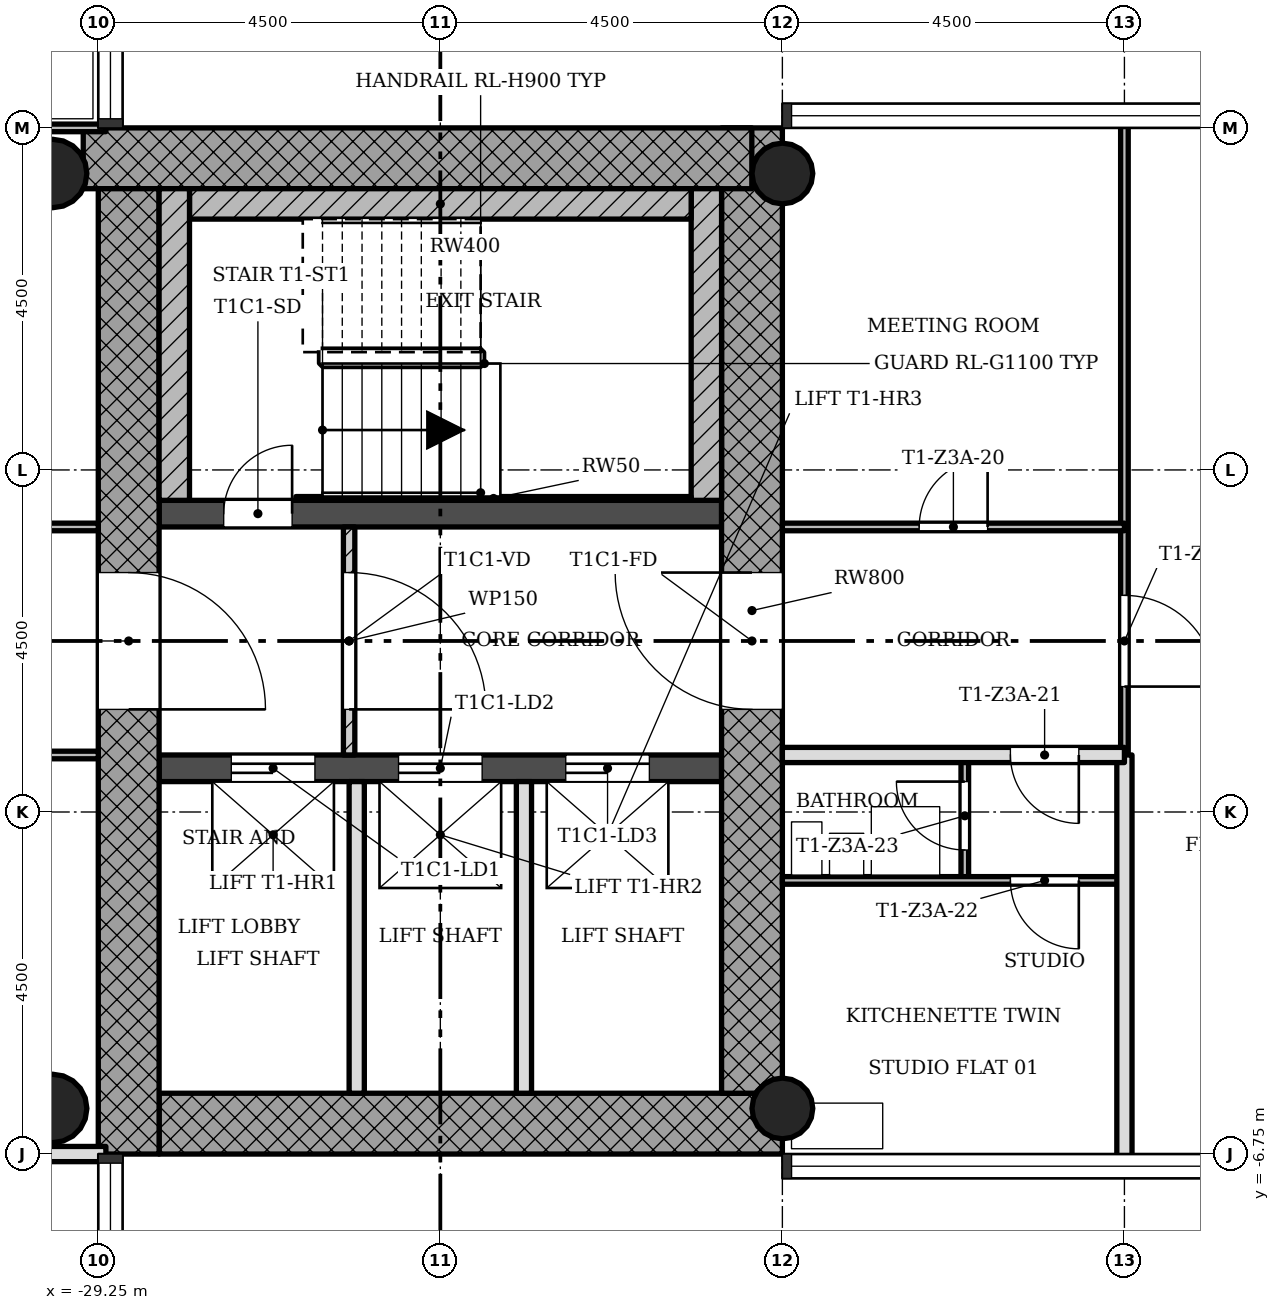
"""IFC4 building model, lengths in metres.
Left out: names, types, materials, properties, quantities, classifications, styles, units other than length and angle.
Written with IfcOpenShell. Run it as: python <this file> out.ifc"""

import sys

from ifc_helpers import new_model, si_unit, direction, frame, frame_2d, origin, origin_2d, place, context, subcontext, project, spatial, rectangle, hollow_circle, extrude, element, fill, save


model = new_model("IFC4")
c1 = context("Model", 3, precision=1e-05, world=origin(), true_north=direction((0.0, 1.0)))
c2 = subcontext(c1, "Body", "Model", "MODEL_VIEW")
j1 = project(units=[si_unit("LENGTHUNIT", "METRE"), si_unit("PLANEANGLEUNIT", "RADIAN")], contexts=[c1])
p1 = place(None, origin())
s1 = spatial("IfcSite", under=j1, at=p1, CompositionType="ELEMENT")
p2 = place(p1, origin())
s2 = spatial("IfcBuilding", under=s1, at=p2, CompositionType="ELEMENT")
p3 = place(p2, frame((0.0, 0.0, 133.7)))
s3 = spatial("IfcBuildingStorey", under=s2, at=p3, CompositionType="ELEMENT", Elevation=133.7)
p4 = place(p3, frame((-28.45, -6.35, 0.0), z_axis=(0.0, 0.0, 1.0), x_axis=(1.0, 0.0, 0.0)))
e1 = element("IfcWall", 1, at=p4, inside=s3, PredefinedType="SHEAR", context=c2, shape_type="SweptSolid", body=[
    extrude(rectangle(XDim=8.2, YDim=0.8, at=frame_2d((4.1, 0.0))), origin(), (0.0, 0.0, 1.0), 3.4),
])
p5 = place(p3, frame((-20.65, -5.95, 0.0), z_axis=(0.0, 0.0, 1.0), x_axis=(0.0, 1.0, 0.0)))
e2 = element("IfcWall", 2, at=p5, inside=s3, PredefinedType="SHEAR", context=c2, shape_type="SweptSolid", body=[
    extrude(rectangle(XDim=12.7, YDim=0.8, at=frame_2d((6.35, 0.0))), origin(), (0.0, 0.0, 1.0), 3.4),
])
p6 = place(p5, frame((5.05, 0.0, 0.0)))
e3 = element("IfcOpeningElement", 3, at=p6, cuts=e2, PredefinedType="OPENING", context=c2, shape_type="SweptSolid", body=[
    extrude(rectangle(XDim=1.8, YDim=2.1, at=frame_2d((0.9, 1.05))), frame((0.0, 0.41, 0.0), z_axis=(0.0, -1.0, 0.0), x_axis=(1.0, 0.0, 0.0)), (0.0, 0.0, 1.0), 0.82),
])
p7 = place(p3, frame((-20.652, 6.35, 0.0), z_axis=(0.0, 0.0, 1.0), x_axis=(-1.0, 0.0, 0.0)))
e4 = element("IfcWall", 4, at=p7, inside=s3, PredefinedType="SHEAR", context=c2, shape_type="SweptSolid", body=[
    extrude(rectangle(XDim=8.796, YDim=0.8, at=frame_2d((4.398, 0.0))), origin(), (0.0, 0.0, 1.0), 3.4),
])
p8 = place(p3, frame((-28.85, 5.95, 0.0), z_axis=(0.0, 0.0, 1.0), x_axis=(0.0, -1.0, 0.0)))
e5 = element("IfcWall", 5, at=p8, inside=s3, PredefinedType="SHEAR", context=c2, shape_type="SweptSolid", body=[
    extrude(rectangle(XDim=12.7, YDim=0.8, at=frame_2d((6.35, 0.0))), origin(), (0.0, 0.0, 1.0), 3.4),
])
p9 = place(p8, frame((5.05, 0.0, 0.0)))
e6 = element("IfcOpeningElement", 6, at=p9, cuts=e5, PredefinedType="OPENING", context=c2, shape_type="SweptSolid", body=[
    extrude(rectangle(XDim=1.8, YDim=2.1, at=frame_2d((0.9, 1.05))), frame((0.0, 0.41, 0.0), z_axis=(0.0, -1.0, 0.0), x_axis=(1.0, 0.0, 0.0)), (0.0, 0.0, 1.0), 0.82),
])
p10 = place(p3, frame((-28.45, -1.675, 0.0), z_axis=(0.0, 0.0, 1.0), x_axis=(1.0, 0.0, 0.0)))
e7 = element("IfcWall", 7, at=p10, inside=s3, PredefinedType="SHEAR", context=c2, shape_type="SweptSolid", body=[
    extrude(rectangle(XDim=7.4, YDim=0.35, at=frame_2d((3.7, 0.0))), origin(), (0.0, 0.0, 1.0), 3.4),
])
p11 = place(p10, frame((0.95, 0.0, 0.0)))
e8 = element("IfcOpeningElement", 8, at=p11, cuts=e7, PredefinedType="OPENING", context=c2, shape_type="SweptSolid", body=[
    extrude(rectangle(XDim=1.1, YDim=2.1, at=frame_2d((0.55, 1.05))), frame((0.0, 0.185, 0.0), z_axis=(0.0, -1.0, 0.0), x_axis=(1.0, 0.0, 0.0)), (0.0, 0.0, 1.0), 0.37),
])
p12 = place(p10, frame((3.15, 0.0, 0.0)))
e9 = element("IfcOpeningElement", 9, at=p12, cuts=e7, PredefinedType="OPENING", context=c2, shape_type="SweptSolid", body=[
    extrude(rectangle(XDim=1.1, YDim=2.1, at=frame_2d((0.55, 1.05))), frame((0.0, 0.185, 0.0), z_axis=(0.0, -1.0, 0.0), x_axis=(1.0, 0.0, 0.0)), (0.0, 0.0, 1.0), 0.37),
])
p13 = place(p10, frame((5.35, 0.0, 0.0)))
e10 = element("IfcOpeningElement", 10, at=p13, cuts=e7, PredefinedType="OPENING", context=c2, shape_type="SweptSolid", body=[
    extrude(rectangle(XDim=1.1, YDim=2.1, at=frame_2d((0.55, 1.05))), frame((0.0, 0.185, 0.0), z_axis=(0.0, -1.0, 0.0), x_axis=(1.0, 0.0, 0.0)), (0.0, 0.0, 1.0), 0.37),
])
p14 = place(p3, frame((-28.45, 1.675, 0.0), z_axis=(0.0, 0.0, 1.0), x_axis=(1.0, 0.0, 0.0)))
e11 = element("IfcWall", 11, at=p14, inside=s3, PredefinedType="SHEAR", context=c2, shape_type="SweptSolid", body=[
    extrude(rectangle(XDim=7.4, YDim=0.35, at=frame_2d((3.7, 0.0))), origin(), (0.0, 0.0, 1.0), 3.4),
])
p15 = place(p14, frame((0.85, 0.0, 0.0)))
e12 = element("IfcOpeningElement", 12, at=p15, cuts=e11, PredefinedType="OPENING", context=c2, shape_type="SweptSolid", body=[
    extrude(rectangle(XDim=0.9, YDim=2.1, at=frame_2d((0.45, 1.05))), frame((0.0, 0.185, 0.0), z_axis=(0.0, -1.0, 0.0), x_axis=(1.0, 0.0, 0.0)), (0.0, 0.0, 1.0), 0.37),
])
for number, where, z_axis, x_axis in (
    (13, (-20.25, -6.15, 0.0), (0.0, 0.0, 1.0), (1.0, 0.0, 0.0)),
    (14, (-20.25, 6.15, 0.0), (0.0, 0.0, 1.0), (1.0, 0.0, 0.0)),
):
    element("IfcColumn", number, at=place(p3, frame(where, z_axis=z_axis, x_axis=x_axis)), inside=s3, PredefinedType="COLUMN", context=c2, shape_type="SweptSolid", body=[
        extrude(hollow_circle(Radius=0.4, WallThickness=0.028, at=origin_2d()), origin(), (0.0, 0.0, 1.0), 3.4),
    ])
for number, where, z_axis, x_axis in (
    (15, (-29.85, -6.15, 0.0), (0.0, 0.0, 1.0), (1.0, 0.0, 0.0)),
    (16, (-29.85, 6.15, 0.0), (0.0, 0.0, 1.0), (1.0, 0.0, 0.0)),
):
    element("IfcColumn", number, at=place(p3, frame(where, z_axis=z_axis, x_axis=x_axis)), inside=s3, PredefinedType="COLUMN", context=c2, shape_type="SweptSolid", body=[
        extrude(hollow_circle(Radius=0.45, WallThickness=0.032, at=origin_2d()), origin(), (0.0, 0.0, 1.0), 3.4),
    ])
p16 = place(p3, frame((-25.95, -1.5, 0.0), z_axis=(0.0, 0.0, 1.0), x_axis=(0.0, 1.0, 0.0)))
e17 = element("IfcWall", 17, at=p16, inside=s3, PredefinedType="PARTITIONING", context=c2, shape_type="SweptSolid", body=[
    extrude(rectangle(XDim=3.0, YDim=0.15, at=frame_2d((1.5, 0.0))), origin(), (0.0, 0.0, 1.0), 3.0),
])
p17 = place(p16, frame((0.6, 0.0, 0.0)))
e18 = element("IfcOpeningElement", 18, at=p17, cuts=e17, PredefinedType="OPENING", context=c2, shape_type="SweptSolid", body=[
    extrude(rectangle(XDim=1.8, YDim=2.1, at=frame_2d((0.9, 1.05))), frame((0.0, 0.085, 0.0), z_axis=(0.0, -1.0, 0.0), x_axis=(1.0, 0.0, 0.0)), (0.0, 0.0, 1.0), 0.17),
])
for number, where, z_axis, x_axis in (
    (19, (-25.85, -5.95, 0.0), (0.0, 0.0, 1.0), (0.0, 1.0, 0.0)),
    (20, (-23.65, -5.95, 0.0), (0.0, 0.0, 1.0), (0.0, 1.0, 0.0)),
):
    element("IfcWall", number, at=place(p3, frame(where, z_axis=z_axis, x_axis=x_axis)), inside=s3, PredefinedType="SOLIDWALL", context=c2, shape_type="SweptSolid", body=[
        extrude(rectangle(XDim=4.1, YDim=0.2, at=frame_2d((2.05, 0.0))), origin(), (0.0, 0.0, 1.0), 3.0),
    ])
p18 = place(p3, frame((-17.85, -3.15, 0.0), z_axis=(0.0, 0.0, 1.0), x_axis=(0.0, 1.0, 0.0)))
e21 = element("IfcWall", 21, at=p18, inside=s3, PredefinedType="PARTITIONING", context=c2, shape_type="SweptSolid", body=[
    extrude(rectangle(XDim=1.65, YDim=0.1, at=frame_2d((0.825, 0.0))), origin(), (0.0, 0.0, 1.0), 3.0),
])
p19 = place(p18, frame((0.4, 0.0, 0.0)))
e22 = element("IfcOpeningElement", 22, at=p19, cuts=e21, PredefinedType="OPENING", context=c2, shape_type="SweptSolid", body=[
    extrude(rectangle(XDim=0.9, YDim=2.1, at=frame_2d((0.45, 1.05))), frame((0.0, 0.06, 0.0), z_axis=(0.0, -1.0, 0.0), x_axis=(1.0, 0.0, 0.0)), (0.0, 0.0, 1.0), 0.12),
])
p20 = place(p3, frame((-15.75, -1.5, 0.0), z_axis=(0.0, 0.0, 1.0), x_axis=(0.0, 1.0, 0.0)))
e23 = element("IfcWall", 23, at=p20, inside=s3, PredefinedType="PARTITIONING", context=c2, shape_type="SweptSolid", body=[
    extrude(rectangle(XDim=8.35, YDim=0.1, at=frame_2d((4.175, 0.0))), origin(), (0.0, 0.0, 1.0), 3.0),
])
p21 = place(p20, frame((0.9, 0.0, 0.0)))
e24 = element("IfcOpeningElement", 24, at=p21, cuts=e23, PredefinedType="OPENING", context=c2, shape_type="SweptSolid", body=[
    extrude(rectangle(XDim=1.2, YDim=2.1, at=frame_2d((0.6, 1.05))), frame((0.0, 0.06, 0.0), z_axis=(0.0, -1.0, 0.0), x_axis=(1.0, 0.0, 0.0)), (0.0, 0.0, 1.0), 0.12),
])
p22 = place(p3, frame((-15.75, -6.85, 0.0), z_axis=(0.0, 0.0, 1.0), x_axis=(0.0, 1.0, 0.0)))
e25 = element("IfcWall", 25, at=p22, inside=s3, PredefinedType="SOLIDWALL", context=c2, shape_type="SweptSolid", body=[
    extrude(rectangle(XDim=5.35, YDim=0.2, at=frame_2d((2.675, 0.0))), origin(), (0.0, 0.0, 1.0), 3.0),
])
p23 = place(p3, frame((-42.85, -6.75, 0.0), z_axis=(0.0, 0.0, 1.0), x_axis=(1.0, 0.0, 0.0)))
e26 = element("IfcWall", 26, at=p23, inside=s3, PredefinedType="SOLIDWALL", context=c2, shape_type="SweptSolid", body=[
    extrude(rectangle(XDim=13.7, YDim=0.2, at=frame_2d((6.85, 0.0))), origin(), (0.0, 0.0, 1.0), 3.0),
])
p24 = place(p23, frame((6.4, 0.0, 0.0)))
e27 = element("IfcOpeningElement", 27, at=p24, cuts=e26, PredefinedType="OPENING", context=c2, shape_type="SweptSolid", body=[
    extrude(rectangle(XDim=0.9, YDim=2.1, at=frame_2d((0.45, 1.05))), frame((0.0, 0.11, 0.0), z_axis=(0.0, -1.0, 0.0), x_axis=(1.0, 0.0, 0.0)), (0.0, 0.0, 1.0), 0.22),
])
p25 = place(p3, frame((-20.25, -3.15, 0.0), z_axis=(0.0, 0.0, 1.0), x_axis=(1.0, 0.0, 0.0)))
e28 = element("IfcWall", 28, at=p25, inside=s3, PredefinedType="PARTITIONING", context=c2, shape_type="SweptSolid", body=[
    extrude(rectangle(XDim=4.5, YDim=0.1, at=frame_2d((2.25, 0.0))), origin(), (0.0, 0.0, 1.0), 3.0),
])
p26 = place(p25, frame((3.0, 0.0, 0.0)))
e29 = element("IfcOpeningElement", 29, at=p26, cuts=e28, PredefinedType="OPENING", context=c2, shape_type="SweptSolid", body=[
    extrude(rectangle(XDim=0.9, YDim=2.1, at=frame_2d((0.45, 1.05))), frame((0.0, 0.06, 0.0), z_axis=(0.0, -1.0, 0.0), x_axis=(1.0, 0.0, 0.0)), (0.0, 0.0, 1.0), 0.12),
])
p27 = place(p3, frame((-31.5, -1.5, 0.0), z_axis=(0.0, 0.0, 1.0), x_axis=(1.0, 0.0, 0.0)))
e30 = element("IfcWall", 30, at=p27, inside=s3, PredefinedType="PARTITIONING", context=c2, shape_type="SweptSolid", body=[
    extrude(rectangle(XDim=2.25, YDim=0.1, at=frame_2d((1.125, 0.0))), origin(), (0.0, 0.0, 1.0), 3.0),
])
p28 = place(p3, frame((-20.25, -1.5, 0.0), z_axis=(0.0, 0.0, 1.0), x_axis=(1.0, 0.0, 0.0)))
e31 = element("IfcWall", 31, at=p28, inside=s3, PredefinedType="SOLIDWALL", context=c2, shape_type="SweptSolid", body=[
    extrude(rectangle(XDim=4.5, YDim=0.2, at=frame_2d((2.25, 0.0))), origin(), (0.0, 0.0, 1.0), 3.0),
])
p29 = place(p28, frame((3.0, 0.0, 0.0)))
e32 = element("IfcOpeningElement", 32, at=p29, cuts=e31, PredefinedType="OPENING", context=c2, shape_type="SweptSolid", body=[
    extrude(rectangle(XDim=0.9, YDim=2.1, at=frame_2d((0.45, 1.05))), frame((0.0, 0.11, 0.0), z_axis=(0.0, -1.0, 0.0), x_axis=(1.0, 0.0, 0.0)), (0.0, 0.0, 1.0), 0.22),
])
p30 = place(p3, frame((-31.5, 1.5, 0.0), z_axis=(0.0, 0.0, 1.0), x_axis=(1.0, 0.0, 0.0)))
e33 = element("IfcWall", 33, at=p30, inside=s3, PredefinedType="PARTITIONING", context=c2, shape_type="SweptSolid", body=[
    extrude(rectangle(XDim=2.25, YDim=0.1, at=frame_2d((1.125, 0.0))), origin(), (0.0, 0.0, 1.0), 3.0),
])
p31 = place(p3, frame((-20.25, 1.5, 0.0), z_axis=(0.0, 0.0, 1.0), x_axis=(1.0, 0.0, 0.0)))
e34 = element("IfcWall", 34, at=p31, inside=s3, PredefinedType="PARTITIONING", context=c2, shape_type="SweptSolid", body=[
    extrude(rectangle(XDim=4.5, YDim=0.1, at=frame_2d((2.25, 0.0))), origin(), (0.0, 0.0, 1.0), 3.0),
])
p32 = place(p31, frame((1.8, 0.0, 0.0)))
e35 = element("IfcOpeningElement", 35, at=p32, cuts=e34, PredefinedType="OPENING", context=c2, shape_type="SweptSolid", body=[
    extrude(rectangle(XDim=0.9, YDim=2.1, at=frame_2d((0.45, 1.05))), frame((0.0, 0.06, 0.0), z_axis=(0.0, -1.0, 0.0), x_axis=(1.0, 0.0, 0.0)), (0.0, 0.0, 1.0), 0.12),
])
p33 = place(p3, frame((-35.1, 6.75, 0.0), z_axis=(0.0, 0.0, 1.0), x_axis=(1.0, 0.0, 0.0)))
e36 = element("IfcWall", 36, at=p33, inside=s3, PredefinedType="PARTITIONING", context=c2, shape_type="SweptSolid", body=[
    extrude(rectangle(XDim=5.95, YDim=0.1, at=frame_2d((2.975, 0.0))), origin(), (0.0, 0.0, 1.0), 3.0),
])
p34 = place(p3, frame((-21.25, 1.85, 0.0), z_axis=(0.0, 0.0, 1.0), x_axis=(0.0, 1.0, 0.0)))
e37 = element("IfcWall", 37, at=p34, inside=s3, PredefinedType="SHEAR", context=c2, shape_type="SweptSolid", body=[
    extrude(rectangle(XDim=4.1, YDim=0.4, at=frame_2d((2.05, 0.0))), origin(), (0.0, 0.0, 1.0), 3.4),
])
p35 = place(p3, frame((-28.05, 5.75, 0.0), z_axis=(0.0, 0.0, 1.0), x_axis=(1.0, 0.0, 0.0)))
e38 = element("IfcWall", 38, at=p35, inside=s3, PredefinedType="SHEAR", context=c2, shape_type="SweptSolid", body=[
    extrude(rectangle(XDim=6.6, YDim=0.4, at=frame_2d((3.3, 0.0))), origin(), (0.0, 0.0, 1.0), 3.4),
])
p36 = place(p3, frame((-28.25, 1.85, 0.0), z_axis=(0.0, 0.0, 1.0), x_axis=(0.0, 1.0, 0.0)))
e39 = element("IfcWall", 39, at=p36, inside=s3, PredefinedType="SHEAR", context=c2, shape_type="SweptSolid", body=[
    extrude(rectangle(XDim=4.1, YDim=0.4, at=frame_2d((2.05, 0.0))), origin(), (0.0, 0.0, 1.0), 3.4),
])
p37 = place(p3, frame((-26.65, 1.875, 0.0), z_axis=(0.0, 0.0, 1.0), x_axis=(1.0, 0.0, 0.0)))
e40 = element("IfcWall", 40, at=p37, inside=s3, PredefinedType="SHEAR", context=c2, shape_type="SweptSolid", body=[
    extrude(rectangle(XDim=5.2, YDim=0.05, at=frame_2d((2.6, 0.0))), origin(), (0.0, 0.0, 1.0), 3.4),
])
p38 = place(p17, origin())
e41 = element("IfcDoor", 41, at=p38, inside=s3, OperationType="SINGLE_SWING_LEFT", PredefinedType="DOOR", context=c2, shape_type="SweptSolid", body=[
    extrude(rectangle(XDim=1.8, YDim=2.1, at=frame_2d((0.9, 1.05))), frame((0.0, 0.025, 0.0), z_axis=(0.0, -1.0, 0.0), x_axis=(1.0, 0.0, 0.0)), (0.0, 0.0, 1.0), 0.05),
])
fill(e18, e41)
p39 = place(p32, origin())
e42 = element("IfcDoor", 42, at=p39, inside=s3, OperationType="SINGLE_SWING_LEFT", PredefinedType="DOOR", context=c2, shape_type="SweptSolid", body=[
    extrude(rectangle(XDim=0.9, YDim=2.1, at=frame_2d((0.45, 1.05))), frame((0.0, 0.025, 0.0), z_axis=(0.0, -1.0, 0.0), x_axis=(1.0, 0.0, 0.0)), (0.0, 0.0, 1.0), 0.05),
])
fill(e35, e42)
p40 = place(p29, origin())
e43 = element("IfcDoor", 43, at=p40, inside=s3, OperationType="SINGLE_SWING_RIGHT", PredefinedType="DOOR", context=c2, shape_type="SweptSolid", body=[
    extrude(rectangle(XDim=0.9, YDim=2.1, at=frame_2d((0.45, 1.05))), frame((0.0, 0.025, 0.0), z_axis=(0.0, -1.0, 0.0), x_axis=(1.0, 0.0, 0.0)), (0.0, 0.0, 1.0), 0.05),
])
fill(e32, e43)
p41 = place(p26, origin())
e44 = element("IfcDoor", 44, at=p41, inside=s3, OperationType="SINGLE_SWING_RIGHT", PredefinedType="DOOR", context=c2, shape_type="SweptSolid", body=[
    extrude(rectangle(XDim=0.9, YDim=2.1, at=frame_2d((0.45, 1.05))), frame((0.0, 0.025, 0.0), z_axis=(0.0, -1.0, 0.0), x_axis=(1.0, 0.0, 0.0)), (0.0, 0.0, 1.0), 0.05),
])
fill(e29, e44)
p42 = place(p19, origin())
e45 = element("IfcDoor", 45, at=p42, inside=s3, OperationType="SINGLE_SWING_LEFT", PredefinedType="DOOR", context=c2, shape_type="SweptSolid", body=[
    extrude(rectangle(XDim=0.9, YDim=2.1, at=frame_2d((0.45, 1.05))), frame((0.0, 0.025, 0.0), z_axis=(0.0, -1.0, 0.0), x_axis=(1.0, 0.0, 0.0)), (0.0, 0.0, 1.0), 0.05),
])
fill(e22, e45)
p43 = place(p21, origin())
e46 = element("IfcDoor", 46, at=p43, inside=s3, OperationType="SINGLE_SWING_LEFT", PredefinedType="DOOR", context=c2, shape_type="SweptSolid", body=[
    extrude(rectangle(XDim=1.2, YDim=2.1, at=frame_2d((0.6, 1.05))), frame((0.0, 0.025, 0.0), z_axis=(0.0, -1.0, 0.0), x_axis=(1.0, 0.0, 0.0)), (0.0, 0.0, 1.0), 0.05),
])
fill(e24, e46)
p44 = place(p15, origin())
e47 = element("IfcDoor", 47, at=p44, inside=s3, OperationType="SINGLE_SWING_LEFT", PredefinedType="DOOR", context=c2, shape_type="SweptSolid", body=[
    extrude(rectangle(XDim=0.9, YDim=2.1, at=frame_2d((0.45, 1.05))), frame((0.0, 0.025, 0.0), z_axis=(0.0, -1.0, 0.0), x_axis=(1.0, 0.0, 0.0)), (0.0, 0.0, 1.0), 0.05),
])
fill(e12, e47)
p45 = place(p11, origin())
e48 = element("IfcDoor", 48, at=p45, inside=s3, OperationType="SLIDING_TO_LEFT", PredefinedType="DOOR", context=c2, shape_type="SweptSolid", body=[
    extrude(rectangle(XDim=1.1, YDim=2.1, at=frame_2d((0.55, 1.05))), frame((0.0, 0.025, 0.0), z_axis=(0.0, -1.0, 0.0), x_axis=(1.0, 0.0, 0.0)), (0.0, 0.0, 1.0), 0.05),
])
fill(e8, e48)
p46 = place(p12, origin())
e49 = element("IfcDoor", 49, at=p46, inside=s3, OperationType="SLIDING_TO_LEFT", PredefinedType="DOOR", context=c2, shape_type="SweptSolid", body=[
    extrude(rectangle(XDim=1.1, YDim=2.1, at=frame_2d((0.55, 1.05))), frame((0.0, 0.025, 0.0), z_axis=(0.0, -1.0, 0.0), x_axis=(1.0, 0.0, 0.0)), (0.0, 0.0, 1.0), 0.05),
])
fill(e9, e49)
p47 = place(p13, origin())
e50 = element("IfcDoor", 50, at=p47, inside=s3, OperationType="SLIDING_TO_LEFT", PredefinedType="DOOR", context=c2, shape_type="SweptSolid", body=[
    extrude(rectangle(XDim=1.1, YDim=2.1, at=frame_2d((0.55, 1.05))), frame((0.0, 0.025, 0.0), z_axis=(0.0, -1.0, 0.0), x_axis=(1.0, 0.0, 0.0)), (0.0, 0.0, 1.0), 0.05),
])
fill(e10, e50)
p48 = place(p9, origin())
e51 = element("IfcDoor", 51, at=p48, inside=s3, OperationType="SINGLE_SWING_LEFT", PredefinedType="DOOR", context=c2, shape_type="SweptSolid", body=[
    extrude(rectangle(XDim=1.8, YDim=2.1, at=frame_2d((0.9, 1.05))), frame((0.0, 0.025, 0.0), z_axis=(0.0, -1.0, 0.0), x_axis=(1.0, 0.0, 0.0)), (0.0, 0.0, 1.0), 0.05),
])
fill(e6, e51)
p49 = place(p6, origin())
e52 = element("IfcDoor", 52, at=p49, inside=s3, OperationType="SINGLE_SWING_LEFT", PredefinedType="DOOR", context=c2, shape_type="SweptSolid", body=[
    extrude(rectangle(XDim=1.8, YDim=2.1, at=frame_2d((0.9, 1.05))), frame((0.0, 0.025, 0.0), z_axis=(0.0, -1.0, 0.0), x_axis=(1.0, 0.0, 0.0)), (0.0, 0.0, 1.0), 0.05),
])
fill(e3, e52)
save(model, sys.argv[1])
